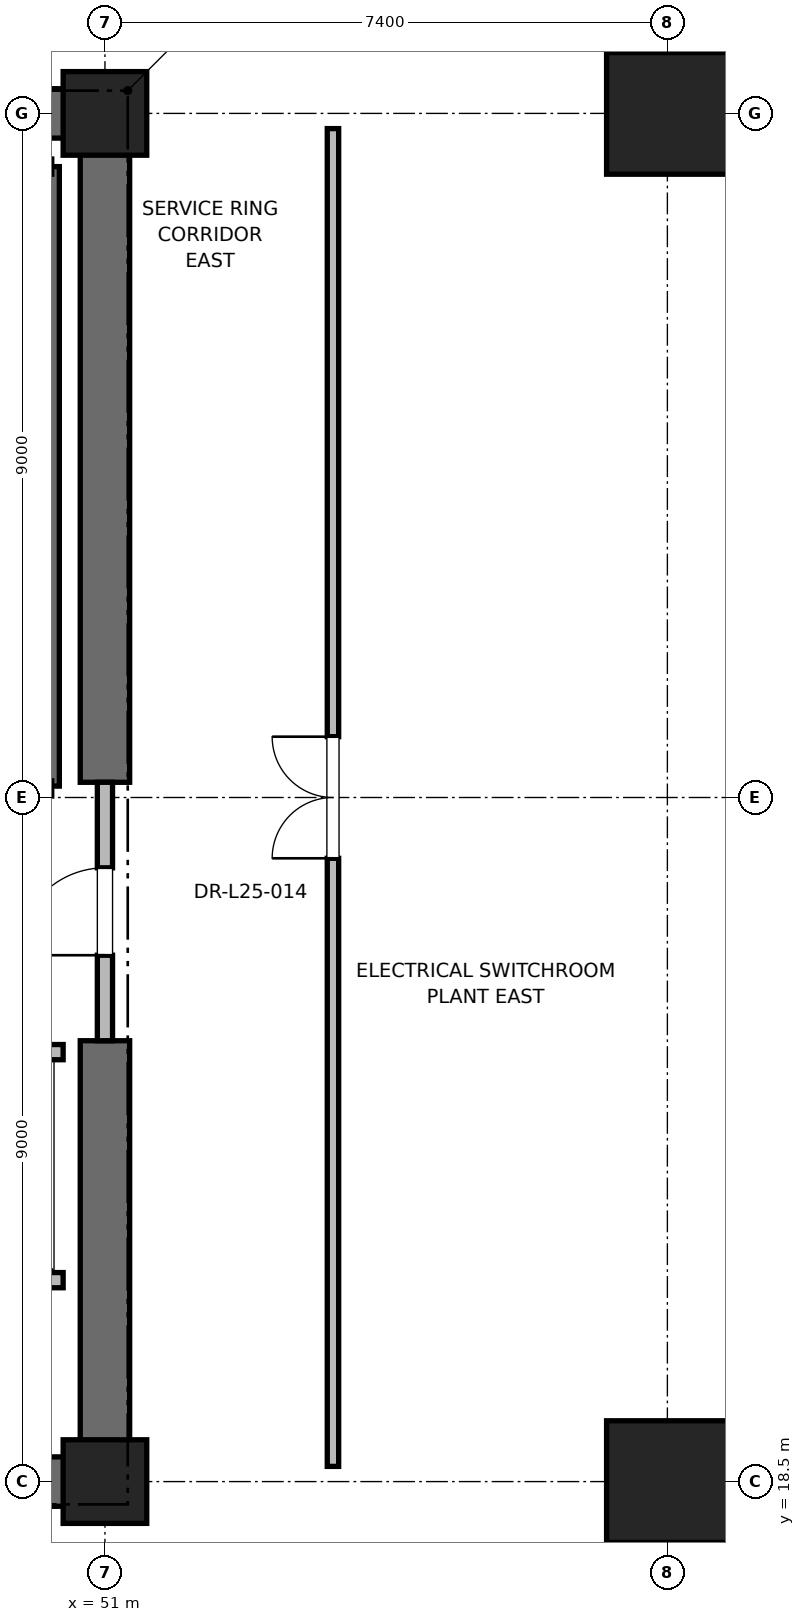
"""IFC4 building model, lengths in metres.
Left out: names, types, materials, properties, quantities, classifications, styles, units other than length and angle.
Written with IfcOpenShell. Run it as: python <this file> out.ifc"""

import sys

from ifc_helpers import new_model, si_unit, direction, frame, frame_2d, origin, origin_2d, place, context, subcontext, project, spatial, rectangle, extrude, element, fill, save


model = new_model("IFC4")
c1 = context("Model", 3, precision=1e-05, world=origin(), true_north=direction((0.0, 1.0)))
c2 = subcontext(c1, "Body", "Model", "MODEL_VIEW")
j1 = project(units=[si_unit("LENGTHUNIT", "METRE"), si_unit("PLANEANGLEUNIT", "RADIAN")], contexts=[c1])
p1 = place(None, origin())
s1 = spatial("IfcSite", under=j1, at=p1, CompositionType="ELEMENT")
p2 = place(p1, origin())
s2 = spatial("IfcBuilding", under=s1, at=p2, CompositionType="ELEMENT")
p3 = place(p2, frame((0.0, 0.0, 107.6)))
s3 = spatial("IfcBuildingStorey", under=s2, at=p3, CompositionType="ELEMENT", Elevation=107.6)
for number, where, z_axis, x_axis in (
    (1, (58.4, 18.5, 0.0), (0.0, 0.0, 1.0), (1.0, 0.0, 0.0)),
    (2, (58.4, 36.5, 0.0), (0.0, 0.0, 1.0), (1.0, 0.0, 0.0)),
):
    element("IfcColumn", number, at=place(p3, frame(where, z_axis=z_axis, x_axis=x_axis)), inside=s3, PredefinedType="COLUMN", context=c2, shape_type="SweptSolid", body=[
        extrude(rectangle(XDim=1.6, YDim=1.6, at=origin_2d()), origin(), (0.0, 0.0, 1.0), 5.4),
    ])
for number, where, z_axis, x_axis in (
    (3, (51.0, 18.5, 0.0), (0.0, 0.0, 1.0), (1.0, 0.0, 0.0)),
    (4, (51.0, 36.5, 0.0), (0.0, 0.0, 1.0), (1.0, 0.0, 0.0)),
):
    element("IfcColumn", number, at=place(p3, frame(where, z_axis=z_axis, x_axis=x_axis)), inside=s3, PredefinedType="PILASTER", context=c2, shape_type="SweptSolid", body=[
        extrude(rectangle(XDim=1.1, YDim=1.1, at=origin_2d()), origin(), (0.0, 0.0, 1.0), 5.4),
    ])
p4 = place(p3, frame((41.8, 18.5, 0.0), z_axis=(0.0, 0.0, 1.0), x_axis=(1.0, 0.0, 0.0)))
e5 = element("IfcWall", 5, at=p4, inside=s3, PredefinedType="SHEAR", context=c2, shape_type="SweptSolid", body=[
    extrude(rectangle(XDim=9.2, YDim=0.65, at=frame_2d((4.6, 0.0))), origin(), (0.0, 0.0, 1.0), 5.1),
])
for number, where, z_axis, x_axis in (
    (6, (45.2, 36.5, 0.0), (0.0, 0.0, 1.0), (1.0, 0.0, 0.0)),
    (7, (51.0, 18.5, 0.0), (0.0, 0.0, 1.0), (0.0, 1.0, 0.0)),
):
    element("IfcWall", number, at=place(p3, frame(where, z_axis=z_axis, x_axis=x_axis)), inside=s3, PredefinedType="SHEAR", context=c2, shape_type="SweptSolid", body=[
        extrude(rectangle(XDim=5.8, YDim=0.65, at=frame_2d((2.9, 0.0))), origin(), (0.0, 0.0, 1.0), 5.1),
    ])
p5 = place(p3, frame((51.0, 27.7, 0.0), z_axis=(0.0, 0.0, 1.0), x_axis=(0.0, 1.0, 0.0)))
e8 = element("IfcWall", 8, at=p5, inside=s3, PredefinedType="SHEAR", context=c2, shape_type="SweptSolid", body=[
    extrude(rectangle(XDim=8.8, YDim=0.65, at=frame_2d((4.4, 0.0))), origin(), (0.0, 0.0, 1.0), 5.1),
])
p6 = place(p3, frame((50.3, 27.65, 0.0), z_axis=(0.0, 0.0, 1.0), x_axis=(0.0, 1.0, 0.0)))
e9 = element("IfcWall", 9, at=p6, inside=s3, PredefinedType="SOLIDWALL", context=c2, shape_type="SweptSolid", body=[
    extrude(rectangle(XDim=8.15, YDim=0.2, at=frame_2d((4.075, 0.0))), origin(), (0.0, 0.0, 1.0), 5.1),
])
p7 = place(p3, frame((51.0, 24.3, 0.0), z_axis=(0.0, 0.0, 1.0), x_axis=(0.0, 1.0, 0.0)))
e10 = element("IfcWall", 10, at=p7, inside=s3, PredefinedType="PARTITIONING", context=c2, shape_type="SweptSolid", body=[
    extrude(rectangle(XDim=3.4, YDim=0.2, at=frame_2d((1.7, 0.0))), origin(), (0.0, 0.0, 1.0), 3.88),
])
p8 = place(p7, frame((1.125, 0.0, 0.0)))
e11 = element("IfcOpeningElement", 11, at=p8, cuts=e10, PredefinedType="OPENING", context=c2, shape_type="SweptSolid", body=[
    extrude(rectangle(XDim=1.15, YDim=2.2, at=frame_2d((0.575, 1.1))), frame((0.0, 0.1, 0.0), z_axis=(0.0, -1.0, 0.0), x_axis=(1.0, 0.0, 0.0)), (0.0, 0.0, 1.0), 0.2),
])
p9 = place(p3, frame((47.85, 21.15, 0.0), z_axis=(0.0, 0.0, 1.0), x_axis=(1.0, 0.0, 0.0)))
e12 = element("IfcWall", 12, at=p9, inside=s3, PredefinedType="SOLIDWALL", context=c2, shape_type="SweptSolid", body=[
    extrude(rectangle(XDim=2.6, YDim=0.2, at=frame_2d((1.3, 0.0))), origin(), (0.0, 0.0, 1.0), 5.1),
])
p10 = place(p3, frame((50.45, 24.15, 0.0), z_axis=(0.0, 0.0, 1.0), x_axis=(-1.0, 0.0, 0.0)))
e13 = element("IfcWall", 13, at=p10, inside=s3, PredefinedType="SOLIDWALL", context=c2, shape_type="SweptSolid", body=[
    extrude(rectangle(XDim=2.6, YDim=0.2, at=frame_2d((1.3, 0.0))), origin(), (0.0, 0.0, 1.0), 3.88),
])
p11 = place(p10, frame((0.75, 0.0, 0.0)))
e14 = element("IfcOpeningElement", 14, at=p11, cuts=e13, PredefinedType="OPENING", context=c2, shape_type="SweptSolid", body=[
    extrude(rectangle(XDim=1.1, YDim=2.2, at=frame_2d((0.55, 1.1))), frame((0.0, 0.1, 0.0), z_axis=(0.0, -1.0, 0.0), x_axis=(1.0, 0.0, 0.0)), (0.0, 0.0, 1.0), 0.2),
])
p12 = place(p3, frame((54.0, 18.7, 0.0), z_axis=(0.0, 0.0, 1.0), x_axis=(0.0, 1.0, 0.0)))
e15 = element("IfcWall", 15, at=p12, inside=s3, PredefinedType="PARTITIONING", context=c2, shape_type="SweptSolid", body=[
    extrude(rectangle(XDim=17.6, YDim=0.15, at=frame_2d((8.8, 0.0))), origin(), (0.0, 0.0, 1.0), 2.85),
])
p13 = place(p12, frame((8.0, 0.0, 0.0)))
e16 = element("IfcOpeningElement", 16, at=p13, cuts=e15, PredefinedType="OPENING", context=c2, shape_type="SweptSolid", body=[
    extrude(rectangle(XDim=1.6, YDim=2.25, at=frame_2d((0.8, 1.125))), frame((0.0, 0.075, 0.0), z_axis=(0.0, -1.0, 0.0), x_axis=(1.0, 0.0, 0.0)), (0.0, 0.0, 1.0), 0.15),
])
p14 = place(p8, origin())
e17 = element("IfcDoor", 17, at=p14, inside=s3, OperationType="SINGLE_SWING_LEFT", PredefinedType="DOOR", context=c2, shape_type="SweptSolid", body=[
    extrude(rectangle(XDim=1.15, YDim=2.2, at=frame_2d((0.575, 1.1))), frame((0.0, 0.025, 0.0), z_axis=(0.0, -1.0, 0.0), x_axis=(1.0, 0.0, 0.0)), (0.0, 0.0, 1.0), 0.05),
])
fill(e11, e17)
p15 = place(p13, origin())
e18 = element("IfcDoor", 18, at=p15, inside=s3, OperationType="DOUBLE_DOOR_SINGLE_SWING", PredefinedType="DOOR", context=c2, shape_type="SweptSolid", body=[
    extrude(rectangle(XDim=1.6, YDim=2.25, at=frame_2d((0.8, 1.125))), frame((0.0, 0.025, 0.0), z_axis=(0.0, -1.0, 0.0), x_axis=(1.0, 0.0, 0.0)), (0.0, 0.0, 1.0), 0.05),
])
fill(e16, e18)
save(model, sys.argv[1])
